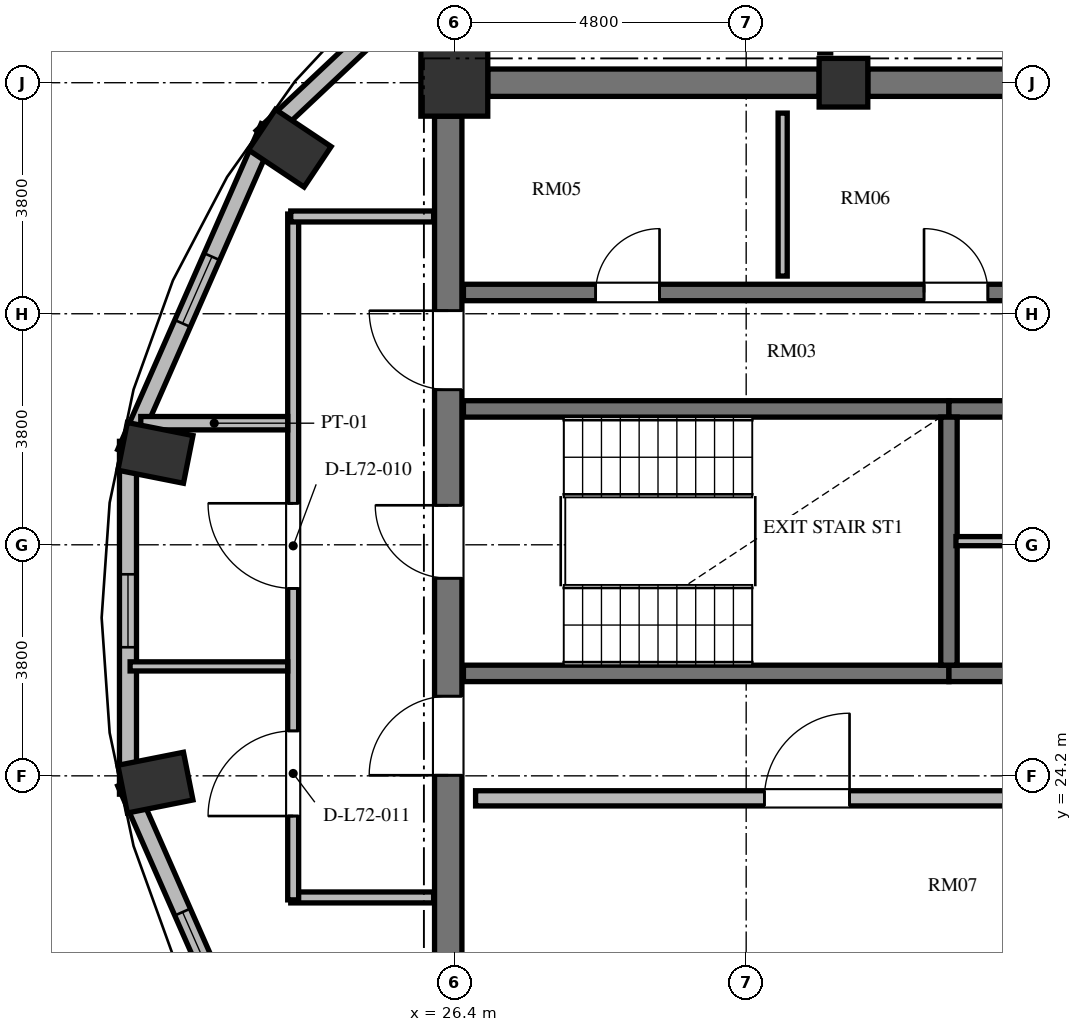
"""IFC4 building model, lengths in metres.
Left out: names, types, materials, properties, quantities, classifications, styles, units other than length and angle.
Written with IfcOpenShell. Run it as: python <this file> out.ifc"""

import sys

from ifc_helpers import new_model, si_unit, direction, frame, frame_2d, origin, origin_2d, place, context, subcontext, project, spatial, rectangle, extrude, element, fill, save


model = new_model("IFC4")
c1 = context("Model", 3, precision=1e-05, world=origin(), true_north=direction((0.0, 1.0)))
c2 = subcontext(c1, "Body", "Model", "MODEL_VIEW")
j1 = project(units=[si_unit("LENGTHUNIT", "METRE"), si_unit("PLANEANGLEUNIT", "RADIAN")], contexts=[c1])
p1 = place(None, origin())
s1 = spatial("IfcSite", under=j1, at=p1, CompositionType="ELEMENT")
p2 = place(p1, origin())
s2 = spatial("IfcBuilding", under=s1, at=p2, CompositionType="ELEMENT")
p3 = place(p2, frame((0.0, 0.0, 276.912)))
s3 = spatial("IfcBuildingStorey", under=s2, at=p3, CompositionType="ELEMENT", Elevation=276.912)
for number, where, z_axis, x_axis in (
    (1, (23.694, 34.522, 0.0), (0.0, 0.0, 1.0), (-0.831, 0.556, 0.0)),
    (2, (21.484, 29.512, 0.0), (0.0, 0.0, 1.0), (-0.981, 0.195, 0.0)),
    (3, (21.484, 24.088, 0.0), (0.0, 0.0, 1.0), (-0.981, -0.195, 0.0)),
):
    element("IfcColumn", number, at=place(p3, frame(where, z_axis=z_axis, x_axis=x_axis)), inside=s3, PredefinedType="COLUMN", context=c2, shape_type="SweptSolid", body=[
        extrude(rectangle(XDim=1.1, YDim=0.8, at=origin_2d()), origin(), (0.0, 0.0, 1.0), 3.648),
    ])
p4 = place(p3, frame((32.8, 35.6, 0.0), z_axis=(0.0, 0.0, 1.0), x_axis=(1.0, 0.0, 0.0)))
e4 = element("IfcColumn", 4, at=p4, inside=s3, PredefinedType="COLUMN", context=c2, shape_type="SweptSolid", body=[
    extrude(rectangle(XDim=0.8, YDim=0.8, at=origin_2d()), origin(), (0.0, 0.0, 1.0), 3.648),
])
p5 = place(p3, frame((26.4, 35.6, 0.0), z_axis=(0.0, 0.0, 1.0), x_axis=(1.0, 0.0, 0.0)))
e5 = element("IfcColumn", 5, at=p5, inside=s3, PredefinedType="COLUMN", context=c2, shape_type="SweptSolid", body=[
    extrude(rectangle(XDim=1.1, YDim=1.1, at=origin_2d()), origin(), (0.0, 0.0, 1.0), 3.648),
])
p6 = place(p3, frame((26.3, 20.95, 0.0), z_axis=(0.0, 0.0, 1.0), x_axis=(0.0, 1.0, 0.0)))
e6 = element("IfcWall", 6, at=p6, inside=s3, PredefinedType="SHEAR", context=c2, shape_type="SweptSolid", body=[
    extrude(rectangle(XDim=14.1, YDim=0.45, at=frame_2d((7.05, 0.0))), origin(), (0.0, 0.0, 1.0), 3.648),
])
p7 = place(p6, frame((6.5, 0.0, 0.0)))
e7 = element("IfcOpeningElement", 7, at=p7, cuts=e6, PredefinedType="OPENING", context=c2, shape_type="SweptSolid", body=[
    extrude(rectangle(XDim=1.2, YDim=2.15, at=frame_2d((0.6, 1.075))), frame((0.0, 0.235, 0.0), z_axis=(0.0, -1.0, 0.0), x_axis=(1.0, 0.0, 0.0)), (0.0, 0.0, 1.0), 0.47),
])
p8 = place(p6, frame((9.6, 0.0, 0.0)))
e8 = element("IfcOpeningElement", 8, at=p8, cuts=e6, PredefinedType="OPENING", context=c2, shape_type="SweptSolid", body=[
    extrude(rectangle(XDim=1.3, YDim=2.2, at=frame_2d((0.65, 1.1))), frame((0.0, 0.235, 0.0), z_axis=(0.0, -1.0, 0.0), x_axis=(1.0, 0.0, 0.0)), (0.0, 0.0, 1.0), 0.47),
])
p9 = place(p6, frame((3.26, 0.0, 0.0)))
e9 = element("IfcOpeningElement", 9, at=p9, cuts=e6, PredefinedType="OPENING", context=c2, shape_type="SweptSolid", body=[
    extrude(rectangle(XDim=1.3, YDim=2.2, at=frame_2d((0.65, 1.1))), frame((0.0, 0.235, 0.0), z_axis=(0.0, -1.0, 0.0), x_axis=(1.0, 0.0, 0.0)), (0.0, 0.0, 1.0), 0.47),
])
p10 = place(p3, frame((26.95, 35.6, 0.0), z_axis=(0.0, 0.0, 1.0), x_axis=(1.0, 0.0, 0.0)))
e10 = element("IfcWall", 10, at=p10, inside=s3, PredefinedType="SHEAR", context=c2, shape_type="SweptSolid", body=[
    extrude(rectangle(XDim=5.45, YDim=0.45, at=frame_2d((2.725, 0.0))), origin(), (0.0, 0.0, 1.0), 3.648),
])
p11 = place(p3, frame((33.2, 35.6, 0.0), z_axis=(0.0, 0.0, 1.0), x_axis=(1.0, 0.0, 0.0)))
e11 = element("IfcWall", 11, at=p11, inside=s3, PredefinedType="SHEAR", context=c2, shape_type="SweptSolid", body=[
    extrude(rectangle(XDim=5.6, YDim=0.45, at=frame_2d((2.8, 0.0))), origin(), (0.0, 0.0, 1.0), 3.648),
])
p12 = place(p3, frame((27.595, 38.808, 0.0), z_axis=(0.0, 0.0, 1.0), x_axis=(-0.728251519923, -0.685309947199, 0.0)))
e12 = element("IfcWall", 12, at=p12, inside=s3, PredefinedType="SOLIDWALL", context=c2, shape_type="SweptSolid", body=[
    extrude(rectangle(XDim=5.981, YDim=0.28, at=frame_2d((2.99, 0.0))), origin(), (0.0, 0.0, 1.0), 3.448),
])
p13 = place(p12, frame((2.391, 0.0, 0.85)))
e13 = element("IfcOpeningElement", 13, at=p13, cuts=e12, PredefinedType="OPENING", context=c2, shape_type="SweptSolid", body=[
    extrude(rectangle(XDim=1.2, YDim=1.8, at=frame_2d((0.6, 0.9))), frame((0.0, 0.15, 0.0), z_axis=(0.0, -1.0, 0.0), x_axis=(1.0, 0.0, 0.0)), (0.0, 0.0, 1.0), 0.3),
])
p14 = place(p3, frame((23.352, 34.869, 0.0), z_axis=(0.0, 0.0, 1.0), x_axis=(-0.402882523888, -0.915251698685, 0.0)))
e14 = element("IfcWall", 14, at=p14, inside=s3, PredefinedType="SOLIDWALL", context=c2, shape_type="SweptSolid", body=[
    extrude(rectangle(XDim=5.856, YDim=0.28, at=frame_2d((2.928, 0.0))), origin(), (0.0, 0.0, 1.0), 3.448),
])
p15 = place(p14, frame((2.328, 0.0, 0.85)))
e15 = element("IfcOpeningElement", 15, at=p15, cuts=e14, PredefinedType="OPENING", context=c2, shape_type="SweptSolid", body=[
    extrude(rectangle(XDim=1.2, YDim=1.8, at=frame_2d((0.6, 0.9))), frame((0.0, 0.15, 0.0), z_axis=(0.0, -1.0, 0.0), x_axis=(1.0, 0.0, 0.0)), (0.0, 0.0, 1.0), 0.3),
])
p16 = place(p3, frame((21.033, 29.701, 0.0), z_axis=(0.0, 0.0, 1.0), x_axis=(0.0, -1.0, 0.0)))
e16 = element("IfcWall", 16, at=p16, inside=s3, PredefinedType="SOLIDWALL", context=c2, shape_type="SweptSolid", body=[
    extrude(rectangle(XDim=5.803, YDim=0.28, at=frame_2d((2.901, 0.0))), origin(), (0.0, 0.0, 1.0), 3.448),
])
p17 = place(p16, frame((2.187, 0.0, 0.85)))
e17 = element("IfcOpeningElement", 17, at=p17, cuts=e16, PredefinedType="OPENING", context=c2, shape_type="SweptSolid", body=[
    extrude(rectangle(XDim=1.2, YDim=1.8, at=frame_2d((0.6, 0.9))), frame((0.0, 0.15, 0.0), z_axis=(0.0, -1.0, 0.0), x_axis=(1.0, 0.0, 0.0)), (0.0, 0.0, 1.0), 0.3),
])
p18 = place(p3, frame((20.993, 24.09, 0.0), z_axis=(0.0, 0.0, 1.0), x_axis=(0.402867150469, -0.91525846572, 0.0)))
e18 = element("IfcWall", 18, at=p18, inside=s3, PredefinedType="SOLIDWALL", context=c2, shape_type="SweptSolid", body=[
    extrude(rectangle(XDim=5.856, YDim=0.28, at=frame_2d((2.928, 0.0))), origin(), (0.0, 0.0, 1.0), 3.448),
])
p19 = place(p18, frame((2.328, 0.0, 0.85)))
e19 = element("IfcOpeningElement", 19, at=p19, cuts=e18, PredefinedType="OPENING", context=c2, shape_type="SweptSolid", body=[
    extrude(rectangle(XDim=1.2, YDim=1.8, at=frame_2d((0.6, 0.9))), frame((0.0, 0.15, 0.0), z_axis=(0.0, -1.0, 0.0), x_axis=(1.0, 0.0, 0.0)), (0.0, 0.0, 1.0), 0.3),
])
p20 = place(p3, frame((26.55, 30.235, 0.0), z_axis=(0.0, 0.0, 1.0), x_axis=(1.0, 0.0, 0.0)))
e20 = element("IfcWall", 20, at=p20, inside=s3, PredefinedType="SHEAR", context=c2, shape_type="SweptSolid", body=[
    extrude(rectangle(XDim=7.985, YDim=0.27, at=frame_2d((3.992, 0.0))), origin(), (0.0, 0.0, 1.0), 3.648),
])
p21 = place(p3, frame((34.535, 30.235, 0.0), z_axis=(0.0, 0.0, 1.0), x_axis=(1.0, 0.0, 0.0)))
e21 = element("IfcWall", 21, at=p21, inside=s3, PredefinedType="SHEAR", context=c2, shape_type="SweptSolid", body=[
    extrude(rectangle(XDim=2.93, YDim=0.27, at=frame_2d((1.465, 0.0))), origin(), (0.0, 0.0, 1.0), 3.648),
])
p22 = place(p21, frame((0.915, 0.0, 0.0)))
e22 = element("IfcOpeningElement", 22, at=p22, cuts=e21, PredefinedType="OPENING", context=c2, shape_type="SweptSolid", body=[
    extrude(rectangle(XDim=1.1, YDim=2.15, at=frame_2d((0.55, 1.075))), frame((0.0, 0.145, 0.0), z_axis=(0.0, -1.0, 0.0), x_axis=(1.0, 0.0, 0.0)), (0.0, 0.0, 1.0), 0.29),
])
p23 = place(p3, frame((26.55, 25.885, 0.0), z_axis=(0.0, 0.0, 1.0), x_axis=(1.0, 0.0, 0.0)))
e23 = element("IfcWall", 23, at=p23, inside=s3, PredefinedType="SHEAR", context=c2, shape_type="SweptSolid", body=[
    extrude(rectangle(XDim=7.985, YDim=0.27, at=frame_2d((3.992, 0.0))), origin(), (0.0, 0.0, 1.0), 3.648),
])
p24 = place(p3, frame((34.535, 25.885, 0.0), z_axis=(0.0, 0.0, 1.0), x_axis=(1.0, 0.0, 0.0)))
e24 = element("IfcWall", 24, at=p24, inside=s3, PredefinedType="SHEAR", context=c2, shape_type="SweptSolid", body=[
    extrude(rectangle(XDim=2.93, YDim=0.27, at=frame_2d((1.465, 0.0))), origin(), (0.0, 0.0, 1.0), 3.648),
])
p25 = place(p24, frame((0.94, 0.0, 0.0)))
e25 = element("IfcOpeningElement", 25, at=p25, cuts=e24, PredefinedType="OPENING", context=c2, shape_type="SweptSolid", body=[
    extrude(rectangle(XDim=1.05, YDim=2.15, at=frame_2d((0.525, 1.075))), frame((0.0, 0.145, 0.0), z_axis=(0.0, -1.0, 0.0), x_axis=(1.0, 0.0, 0.0)), (0.0, 0.0, 1.0), 0.29),
])
p26 = place(p3, frame((34.535, 26.02, 0.0), z_axis=(0.0, 0.0, 1.0), x_axis=(0.0, 1.0, 0.0)))
e26 = element("IfcWall", 26, at=p26, inside=s3, PredefinedType="SHEAR", context=c2, shape_type="SweptSolid", body=[
    extrude(rectangle(XDim=4.08, YDim=0.27, at=frame_2d((2.04, 0.0))), origin(), (0.0, 0.0, 1.0), 3.648),
])
p27 = place(p3, frame((34.65, 28.06, 0.0), z_axis=(0.0, 0.0, 1.0), x_axis=(1.0, 0.0, 0.0)))
e27 = element("IfcWall", 27, at=p27, inside=s3, PredefinedType="PARTITIONING", context=c2, shape_type="SweptSolid", body=[
    extrude(rectangle(XDim=2.7, YDim=0.15, at=frame_2d((1.35, 0.0))), origin(), (0.0, 0.0, 1.0), 3.448),
])
p28 = place(p3, frame((26.55, 32.15, 0.0), z_axis=(0.0, 0.0, 1.0), x_axis=(1.0, 0.0, 0.0)))
e28 = element("IfcWall", 28, at=p28, inside=s3, PredefinedType="SHEAR", context=c2, shape_type="SweptSolid", body=[
    extrude(rectangle(XDim=16.4, YDim=0.27, at=frame_2d((8.2, 0.0))), origin(), (0.0, 0.0, 1.0), 3.648),
])
p29 = place(p28, frame((2.175, 0.0, 0.0)))
e29 = element("IfcOpeningElement", 29, at=p29, cuts=e28, PredefinedType="OPENING", context=c2, shape_type="SweptSolid", body=[
    extrude(rectangle(XDim=1.05, YDim=2.15, at=frame_2d((0.525, 1.075))), frame((0.0, 0.145, 0.0), z_axis=(0.0, -1.0, 0.0), x_axis=(1.0, 0.0, 0.0)), (0.0, 0.0, 1.0), 0.29),
])
p30 = place(p28, frame((7.575, 0.0, 0.0)))
e30 = element("IfcOpeningElement", 30, at=p30, cuts=e28, PredefinedType="OPENING", context=c2, shape_type="SweptSolid", body=[
    extrude(rectangle(XDim=1.05, YDim=2.15, at=frame_2d((0.525, 1.075))), frame((0.0, 0.145, 0.0), z_axis=(0.0, -1.0, 0.0), x_axis=(1.0, 0.0, 0.0)), (0.0, 0.0, 1.0), 0.29),
])
p31 = place(p28, frame((11.9, 0.0, 0.0)))
e31 = element("IfcOpeningElement", 31, at=p31, cuts=e28, PredefinedType="OPENING", context=c2, shape_type="SweptSolid", body=[
    extrude(rectangle(XDim=1.1, YDim=2.2, at=frame_2d((0.55, 1.1))), frame((0.0, 0.145, 0.0), z_axis=(0.0, -1.0, 0.0), x_axis=(1.0, 0.0, 0.0)), (0.0, 0.0, 1.0), 0.29),
])
p32 = place(p28, frame((14.5, 0.0, 0.0)))
e32 = element("IfcOpeningElement", 32, at=p32, cuts=e28, PredefinedType="OPENING", context=c2, shape_type="SweptSolid", body=[
    extrude(rectangle(XDim=1.1, YDim=2.2, at=frame_2d((0.55, 1.1))), frame((0.0, 0.145, 0.0), z_axis=(0.0, -1.0, 0.0), x_axis=(1.0, 0.0, 0.0)), (0.0, 0.0, 1.0), 0.29),
])
p33 = place(p3, frame((26.75, 23.83, 0.0), z_axis=(0.0, 0.0, 1.0), x_axis=(1.0, 0.0, 0.0)))
e33 = element("IfcWall", 33, at=p33, inside=s3, PredefinedType="SOLIDWALL", context=c2, shape_type="SweptSolid", body=[
    extrude(rectangle(XDim=16.2, YDim=0.25, at=frame_2d((8.1, 0.0))), origin(), (0.0, 0.0, 1.0), 3.448),
])
p34 = place(p33, frame((4.75, 0.0, 0.0)))
e34 = element("IfcOpeningElement", 34, at=p34, cuts=e33, PredefinedType="OPENING", context=c2, shape_type="SweptSolid", body=[
    extrude(rectangle(XDim=1.4, YDim=2.2, at=frame_2d((0.7, 1.1))), frame((0.0, 0.135, 0.0), z_axis=(0.0, -1.0, 0.0), x_axis=(1.0, 0.0, 0.0)), (0.0, 0.0, 1.0), 0.27),
])
p35 = place(p33, frame((11.7, 0.0, 0.0)))
e35 = element("IfcOpeningElement", 35, at=p35, cuts=e33, PredefinedType="OPENING", context=c2, shape_type="SweptSolid", body=[
    extrude(rectangle(XDim=1.1, YDim=2.2, at=frame_2d((0.55, 1.1))), frame((0.0, 0.135, 0.0), z_axis=(0.0, -1.0, 0.0), x_axis=(1.0, 0.0, 0.0)), (0.0, 0.0, 1.0), 0.27),
])
p36 = place(p33, frame((14.15, 0.0, 0.0)))
e36 = element("IfcOpeningElement", 36, at=p36, cuts=e33, PredefinedType="OPENING", context=c2, shape_type="SweptSolid", body=[
    extrude(rectangle(XDim=1.4, YDim=2.3, at=frame_2d((0.7, 1.15))), frame((0.0, 0.135, 0.0), z_axis=(0.0, -1.0, 0.0), x_axis=(1.0, 0.0, 0.0)), (0.0, 0.0, 1.0), 0.27),
])
p37 = place(p3, frame((31.8, 32.42, 0.0), z_axis=(0.0, 0.0, 1.0), x_axis=(0.0, 1.0, 0.0)))
e37 = element("IfcWall", 37, at=p37, inside=s3, PredefinedType="PARTITIONING", context=c2, shape_type="SweptSolid", body=[
    extrude(rectangle(XDim=2.68, YDim=0.15, at=frame_2d((1.34, 0.0))), origin(), (0.0, 0.0, 1.0), 3.448),
])
p38 = place(p3, frame((32.5, 36.09, 0.0), z_axis=(0.0, 0.0, 1.0), x_axis=(0.0, 1.0, 0.0)))
e38 = element("IfcWall", 38, at=p38, inside=s3, PredefinedType="PARTITIONING", context=c2, shape_type="SweptSolid", body=[
    extrude(rectangle(XDim=2.35, YDim=0.18, at=frame_2d((1.175, 0.0))), origin(), (0.0, 0.0, 1.0), 3.448),
])
p39 = place(p3, frame((26.06, 22.2, 0.0), z_axis=(0.0, 0.0, 1.0), x_axis=(-1.0, 0.0, 0.0)))
e39 = element("IfcWall", 39, at=p39, inside=s3, PredefinedType="PARTITIONING", context=c2, shape_type="SweptSolid", body=[
    extrude(rectangle(XDim=2.35, YDim=0.18, at=frame_2d((1.175, 0.0))), origin(), (0.0, 0.0, 1.0), 3.448),
])
p40 = place(p3, frame((23.75, 22.16, 0.0), z_axis=(0.0, 0.0, 1.0), x_axis=(0.0, 1.0, 0.0)))
e40 = element("IfcWall", 40, at=p40, inside=s3, PredefinedType="PARTITIONING", context=c2, shape_type="SweptSolid", body=[
    extrude(rectangle(XDim=11.28, YDim=0.18, at=frame_2d((5.64, 0.0))), origin(), (0.0, 0.0, 1.0), 3.448),
])
p41 = place(p40, frame((5.123, 0.0, 0.0)))
e41 = element("IfcOpeningElement", 41, at=p41, cuts=e40, PredefinedType="OPENING", context=c2, shape_type="SweptSolid", body=[
    extrude(rectangle(XDim=1.4, YDim=2.2, at=frame_2d((0.7, 1.1))), frame((0.0, 0.1, 0.0), z_axis=(0.0, -1.0, 0.0), x_axis=(1.0, 0.0, 0.0)), (0.0, 0.0, 1.0), 0.2),
])
p42 = place(p40, frame((1.379, 0.0, 0.0)))
e42 = element("IfcOpeningElement", 42, at=p42, cuts=e40, PredefinedType="OPENING", context=c2, shape_type="SweptSolid", body=[
    extrude(rectangle(XDim=1.4, YDim=2.2, at=frame_2d((0.7, 1.1))), frame((0.0, 0.1, 0.0), z_axis=(0.0, -1.0, 0.0), x_axis=(1.0, 0.0, 0.0)), (0.0, 0.0, 1.0), 0.2),
])
p43 = place(p3, frame((23.71, 33.4, 0.0), z_axis=(0.0, 0.0, 1.0), x_axis=(1.0, 0.0, 0.0)))
e43 = element("IfcWall", 43, at=p43, inside=s3, PredefinedType="PARTITIONING", context=c2, shape_type="SweptSolid", body=[
    extrude(rectangle(XDim=2.35, YDim=0.18, at=frame_2d((1.175, 0.0))), origin(), (0.0, 0.0, 1.0), 3.448),
])
p44 = place(p3, frame((21.068, 26.0, 0.0), z_axis=(0.0, 0.0, 1.0), x_axis=(1.0, 0.0, 0.0)))
e44 = element("IfcWall", 44, at=p44, inside=s3, PredefinedType="PARTITIONING", context=c2, shape_type="SweptSolid", body=[
    extrude(rectangle(XDim=2.592, YDim=0.15, at=frame_2d((1.296, 0.0))), origin(), (0.0, 0.0, 1.0), 3.448),
])
p45 = place(p3, frame((21.244, 30.0, 0.0), z_axis=(0.0, 0.0, 1.0), x_axis=(1.0, 0.0, 0.0)))
e45 = element("IfcWall", 45, at=p45, inside=s3, PredefinedType="PARTITIONING", context=c2, shape_type="SweptSolid", body=[
    extrude(rectangle(XDim=2.416, YDim=0.22, at=frame_2d((1.208, 0.0))), origin(), (0.0, 0.0, 1.0), 3.448),
])
p46 = place(p15, origin())
e46 = element("IfcWindow", 46, at=p46, inside=s3, PartitioningType="SINGLE_PANEL", PredefinedType="WINDOW", context=c2, shape_type="SweptSolid", body=[
    extrude(rectangle(XDim=1.2, YDim=1.8, at=frame_2d((0.6, 0.9))), frame((0.0, 0.03, 0.0), z_axis=(0.0, -1.0, 0.0), x_axis=(1.0, 0.0, 0.0)), (0.0, 0.0, 1.0), 0.06),
])
fill(e15, e46)
p47 = place(p17, origin())
e47 = element("IfcWindow", 47, at=p47, inside=s3, PartitioningType="SINGLE_PANEL", PredefinedType="WINDOW", context=c2, shape_type="SweptSolid", body=[
    extrude(rectangle(XDim=1.2, YDim=1.8, at=frame_2d((0.6, 0.9))), frame((0.0, 0.03, 0.0), z_axis=(0.0, -1.0, 0.0), x_axis=(1.0, 0.0, 0.0)), (0.0, 0.0, 1.0), 0.06),
])
fill(e17, e47)
p48 = place(p19, origin())
e48 = element("IfcWindow", 48, at=p48, inside=s3, PartitioningType="SINGLE_PANEL", PredefinedType="WINDOW", context=c2, shape_type="SweptSolid", body=[
    extrude(rectangle(XDim=1.2, YDim=1.8, at=frame_2d((0.6, 0.9))), frame((0.0, 0.03, 0.0), z_axis=(0.0, -1.0, 0.0), x_axis=(1.0, 0.0, 0.0)), (0.0, 0.0, 1.0), 0.06),
])
fill(e19, e48)
p49 = place(p7, origin())
e49 = element("IfcDoor", 49, at=p49, inside=s3, OperationType="SINGLE_SWING_RIGHT", PredefinedType="DOOR", context=c2, shape_type="SweptSolid", body=[
    extrude(rectangle(XDim=1.2, YDim=2.15, at=frame_2d((0.6, 1.075))), frame((0.0, 0.025, 0.0), z_axis=(0.0, -1.0, 0.0), x_axis=(1.0, 0.0, 0.0)), (0.0, 0.0, 1.0), 0.05),
])
fill(e7, e49)
p50 = place(p8, origin())
e50 = element("IfcDoor", 50, at=p50, inside=s3, OperationType="SINGLE_SWING_RIGHT", PredefinedType="DOOR", context=c2, shape_type="SweptSolid", body=[
    extrude(rectangle(XDim=1.3, YDim=2.2, at=frame_2d((0.65, 1.1))), frame((0.0, 0.025, 0.0), z_axis=(0.0, -1.0, 0.0), x_axis=(1.0, 0.0, 0.0)), (0.0, 0.0, 1.0), 0.05),
])
fill(e8, e50)
p51 = place(p9, origin())
e51 = element("IfcDoor", 51, at=p51, inside=s3, OperationType="SINGLE_SWING_LEFT", PredefinedType="DOOR", context=c2, shape_type="SweptSolid", body=[
    extrude(rectangle(XDim=1.3, YDim=2.2, at=frame_2d((0.65, 1.1))), frame((0.0, 0.025, 0.0), z_axis=(0.0, -1.0, 0.0), x_axis=(1.0, 0.0, 0.0)), (0.0, 0.0, 1.0), 0.05),
])
fill(e9, e51)
p52 = place(p29, origin())
e52 = element("IfcDoor", 52, at=p52, inside=s3, OperationType="SINGLE_SWING_RIGHT", PredefinedType="DOOR", context=c2, shape_type="SweptSolid", body=[
    extrude(rectangle(XDim=1.05, YDim=2.15, at=frame_2d((0.525, 1.075))), frame((0.0, 0.025, 0.0), z_axis=(0.0, -1.0, 0.0), x_axis=(1.0, 0.0, 0.0)), (0.0, 0.0, 1.0), 0.05),
])
fill(e29, e52)
p53 = place(p30, origin())
e53 = element("IfcDoor", 53, at=p53, inside=s3, OperationType="SINGLE_SWING_LEFT", PredefinedType="DOOR", context=c2, shape_type="SweptSolid", body=[
    extrude(rectangle(XDim=1.05, YDim=2.15, at=frame_2d((0.525, 1.075))), frame((0.0, 0.025, 0.0), z_axis=(0.0, -1.0, 0.0), x_axis=(1.0, 0.0, 0.0)), (0.0, 0.0, 1.0), 0.05),
])
fill(e30, e53)
p54 = place(p34, origin())
e54 = element("IfcDoor", 54, at=p54, inside=s3, OperationType="SINGLE_SWING_RIGHT", PredefinedType="DOOR", context=c2, shape_type="SweptSolid", body=[
    extrude(rectangle(XDim=1.4, YDim=2.2, at=frame_2d((0.7, 1.1))), frame((0.0, 0.025, 0.0), z_axis=(0.0, -1.0, 0.0), x_axis=(1.0, 0.0, 0.0)), (0.0, 0.0, 1.0), 0.05),
])
fill(e34, e54)
p55 = place(p41, origin())
e55 = element("IfcDoor", 55, at=p55, inside=s3, OperationType="SINGLE_SWING_RIGHT", PredefinedType="DOOR", context=c2, shape_type="SweptSolid", body=[
    extrude(rectangle(XDim=1.4, YDim=2.2, at=frame_2d((0.7, 1.1))), frame((0.0, 0.025, 0.0), z_axis=(0.0, -1.0, 0.0), x_axis=(1.0, 0.0, 0.0)), (0.0, 0.0, 1.0), 0.05),
])
fill(e41, e55)
p56 = place(p42, origin())
e56 = element("IfcDoor", 56, at=p56, inside=s3, OperationType="SINGLE_SWING_LEFT", PredefinedType="DOOR", context=c2, shape_type="SweptSolid", body=[
    extrude(rectangle(XDim=1.4, YDim=2.2, at=frame_2d((0.7, 1.1))), frame((0.0, 0.025, 0.0), z_axis=(0.0, -1.0, 0.0), x_axis=(1.0, 0.0, 0.0)), (0.0, 0.0, 1.0), 0.05),
])
fill(e42, e56)
save(model, sys.argv[1])
